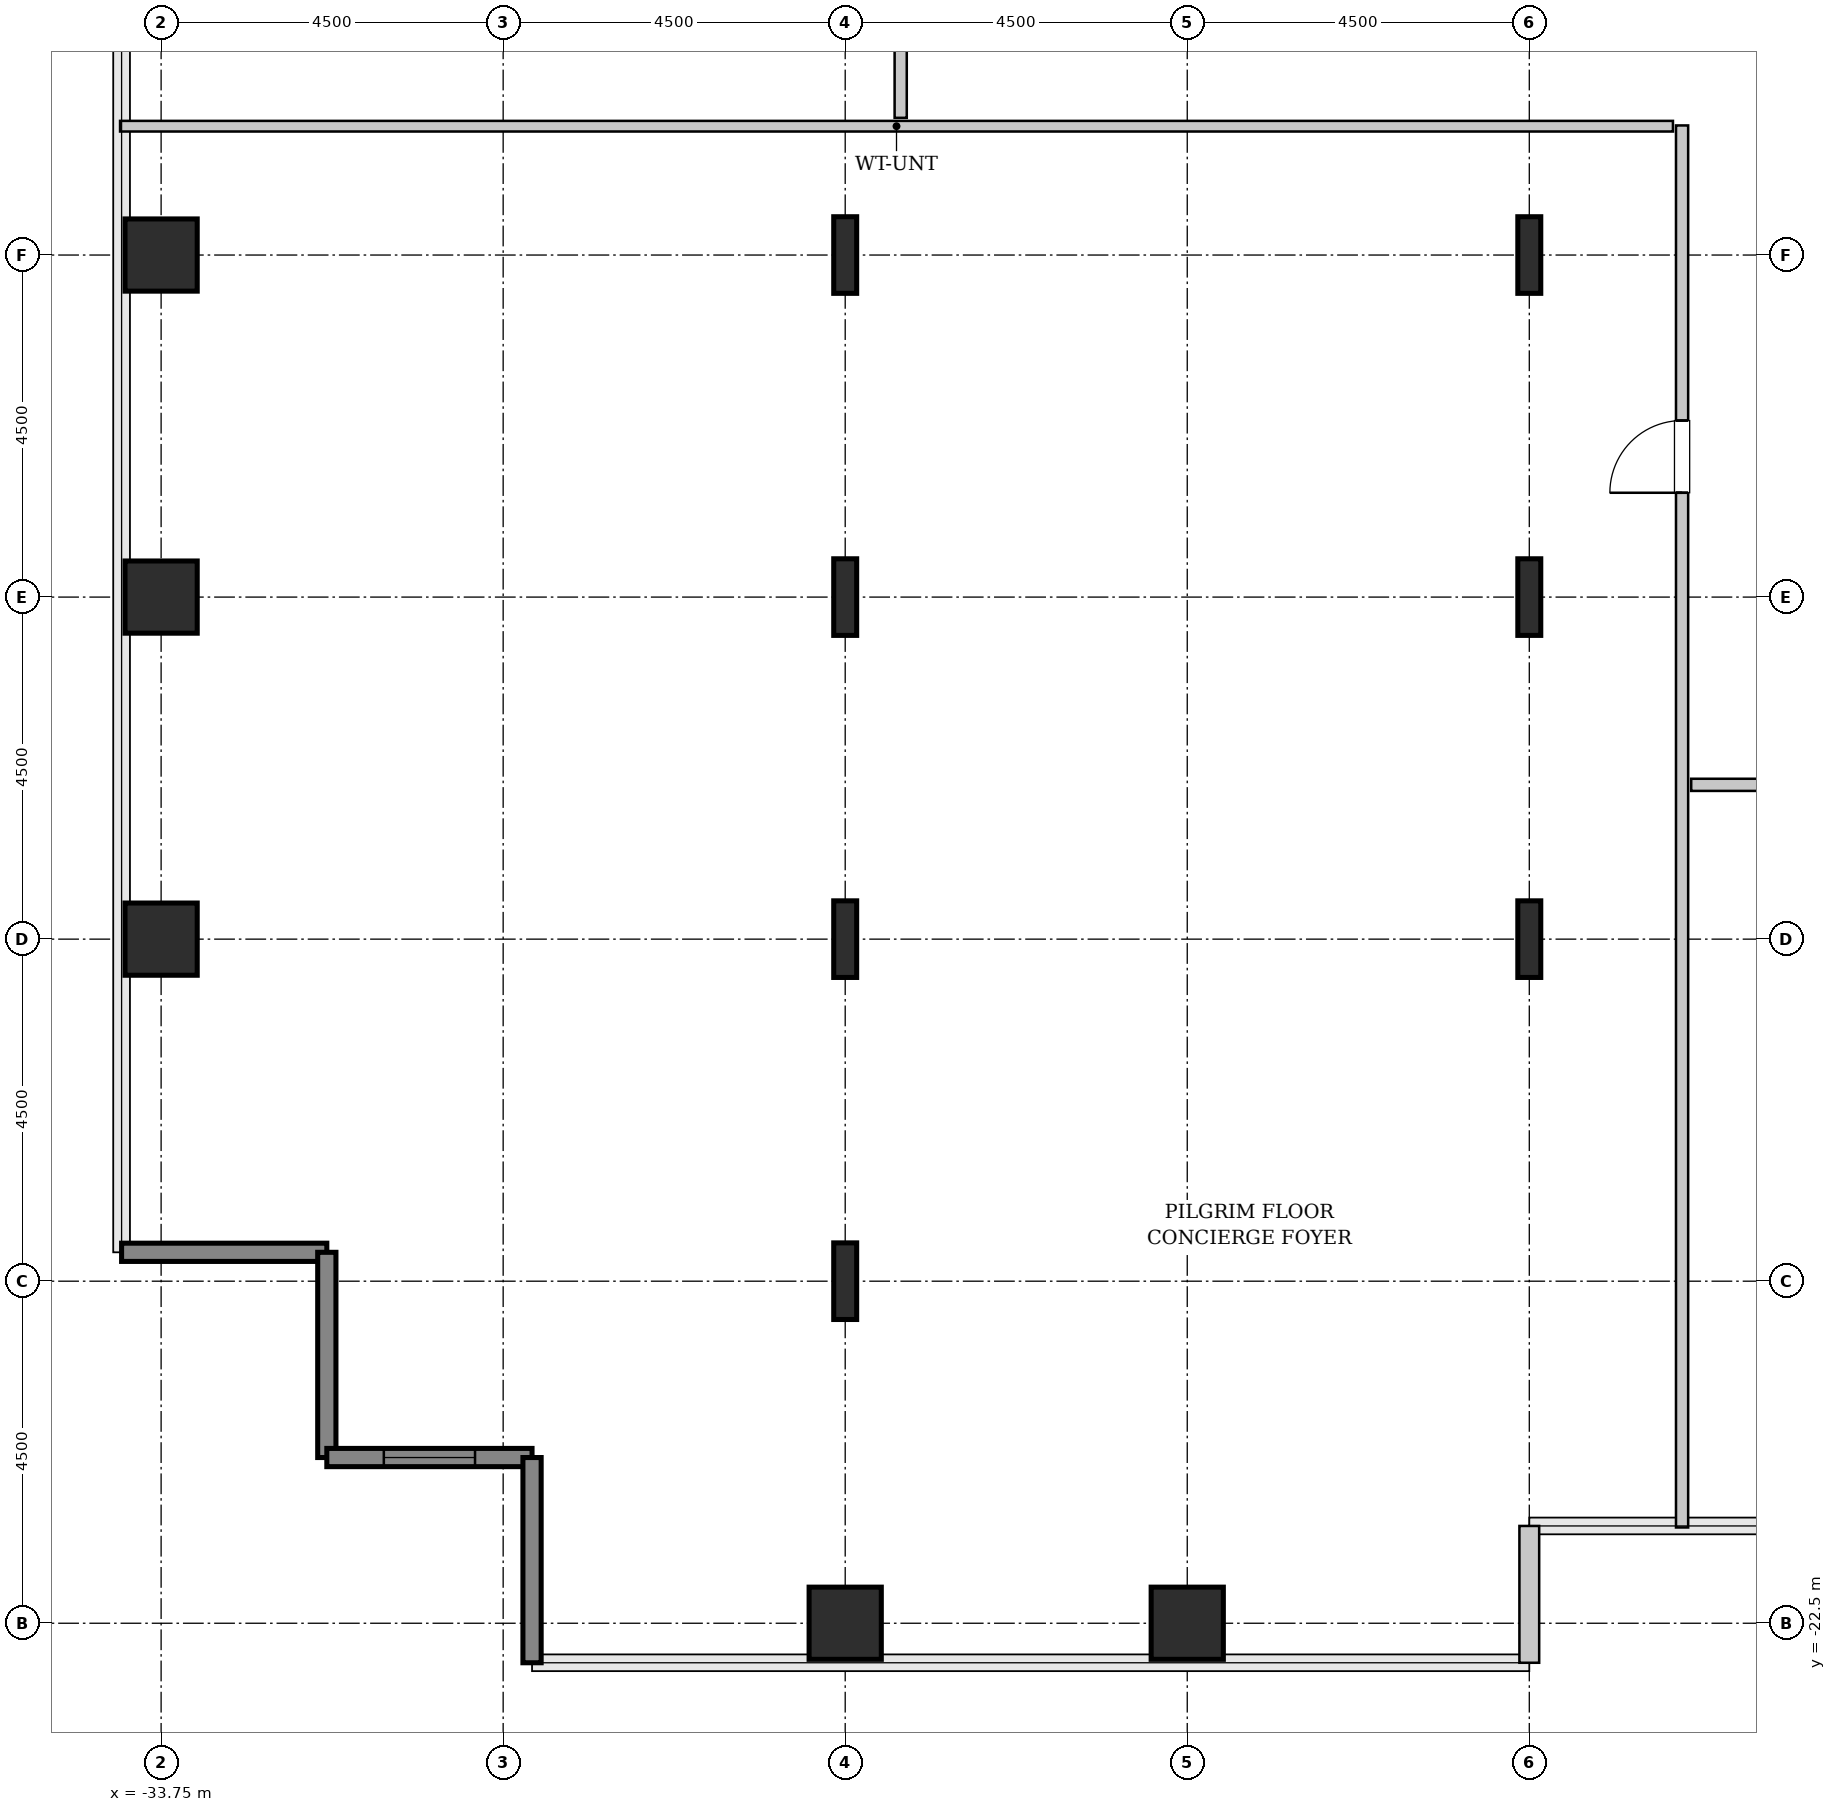
"""IFC4 building model, lengths in metres.
Left out: names, types, materials, properties, quantities, classifications, styles, units other than length and angle.
Written with IfcOpenShell. Run it as: python <this file> out.ifc"""

import sys

from ifc_helpers import new_model, si_unit, direction, frame, frame_2d, origin, origin_2d, place, context, subcontext, project, spatial, rectangle, hollow_rectangle, i_section, extrude, source, transform, mapped, element, fill, save


model = new_model("IFC4")
c1 = context("Model", 3, precision=1e-05, world=origin(), true_north=direction((0.0, 1.0)))
c2 = subcontext(c1, "Body", "Model", "MODEL_VIEW")
j1 = project(units=[si_unit("LENGTHUNIT", "METRE"), si_unit("PLANEANGLEUNIT", "RADIAN")], contexts=[c1])
p1 = place(None, origin())
s1 = spatial("IfcSite", under=j1, at=p1, CompositionType="ELEMENT")
p2 = place(p1, origin())
s2 = spatial("IfcBuilding", under=s1, at=p2, CompositionType="ELEMENT")
p3 = place(p2, frame((0.0, 0.0, 106.0)))
s3 = spatial("IfcBuildingStorey", under=s2, at=p3, CompositionType="ELEMENT", Elevation=106.0)
m1 = source(origin(), c2, "Body", "SweptSolid", [
    extrude(hollow_rectangle(XDim=0.95, YDim=0.95, WallThickness=0.045, InnerFilletRadius=0.045, OuterFilletRadius=0.09, at=origin_2d()), origin(), (0.0, 0.0, 1.0), 3.8),
])
for number, where, z_axis, x_axis in (
    (1, (-33.75, -13.5, 0.0), (0.0, 0.0, 1.0), (1.0, 0.0, 0.0)),
    (2, (-33.75, -9.0, 0.0), (0.0, 0.0, 1.0), (1.0, 0.0, 0.0)),
    (3, (-33.75, -4.5, 0.0), (0.0, 0.0, 1.0), (1.0, 0.0, 0.0)),
    (4, (-24.75, -22.5, 0.0), (0.0, 0.0, 1.0), (1.0, 0.0, 0.0)),
):
    element("IfcColumn", number, at=place(p3, frame(where, z_axis=z_axis, x_axis=x_axis)), inside=s3, PredefinedType="COLUMN", context=c2, shape_type="MappedRepresentation", body=[
        mapped(m1, transform((0.0, 0.0, 0.0), x_axis=(1.0, 0.0, 0.0), y_axis=(0.0, 1.0, 0.0), z_axis=(0.0, 0.0, 1.0), scale=1.0)),
    ])
m2 = source(origin(), c2, "Body", "SweptSolid", [
    extrude(i_section(OverallWidth=0.302, OverallDepth=1.008, WebThickness=0.021, FlangeThickness=0.04, FilletRadius=0.03, at=origin_2d()), origin(), (0.0, 0.0, 1.0), 3.8),
])
for number, where, z_axis, x_axis in (
    (5, (-24.75, -18.0, 0.0), (0.0, 0.0, 1.0), (1.0, 0.0, 0.0)),
    (6, (-24.75, -13.5, 0.0), (0.0, 0.0, 1.0), (1.0, 0.0, 0.0)),
    (7, (-24.75, -9.0, 0.0), (0.0, 0.0, 1.0), (1.0, 0.0, 0.0)),
    (8, (-24.75, -4.5, 0.0), (0.0, 0.0, 1.0), (1.0, 0.0, 0.0)),
):
    element("IfcColumn", number, at=place(p3, frame(where, z_axis=z_axis, x_axis=x_axis)), inside=s3, PredefinedType="COLUMN", context=c2, shape_type="MappedRepresentation", body=[
        mapped(m2, transform((0.0, 0.0, 0.0), x_axis=(1.0, 0.0, 0.0), y_axis=(0.0, 1.0, 0.0), z_axis=(0.0, 0.0, 1.0), scale=1.0)),
    ])
p4 = place(p3, frame((-20.25, -22.5, 0.0), z_axis=(0.0, 0.0, 1.0), x_axis=(1.0, 0.0, 0.0)))
e9 = element("IfcColumn", 9, at=p4, inside=s3, PredefinedType="COLUMN", context=c2, shape_type="MappedRepresentation", body=[
    mapped(m1, transform((0.0, 0.0, 0.0), x_axis=(1.0, 0.0, 0.0), y_axis=(0.0, 1.0, 0.0), z_axis=(0.0, 0.0, 1.0), scale=1.0)),
])
for number, where, z_axis, x_axis in (
    (10, (-15.75, -13.5, 0.0), (0.0, 0.0, 1.0), (1.0, 0.0, 0.0)),
    (11, (-15.75, -9.0, 0.0), (0.0, 0.0, 1.0), (1.0, 0.0, 0.0)),
    (12, (-15.75, -4.5, 0.0), (0.0, 0.0, 1.0), (1.0, 0.0, 0.0)),
):
    element("IfcColumn", number, at=place(p3, frame(where, z_axis=z_axis, x_axis=x_axis)), inside=s3, PredefinedType="COLUMN", context=c2, shape_type="MappedRepresentation", body=[
        mapped(m2, transform((0.0, 0.0, 0.0), x_axis=(1.0, 0.0, 0.0), y_axis=(0.0, 1.0, 0.0), z_axis=(0.0, 0.0, 1.0), scale=1.0)),
    ])
m3 = source(origin(), c2, "Body", "SweptSolid", [
    extrude(rectangle(XDim=2.7, YDim=0.24, at=frame_2d((1.35, 0.0))), origin(), (0.0, 0.0, 1.0), 3.55),
])
for number, where, z_axis, x_axis in (
    (13, (-34.27, -17.62, 0.0), (0.0, 0.0, 1.0), (1.0, 0.0, 0.0)),
    (14, (-31.57, -17.62, 0.0), (0.0, 0.0, 1.0), (0.0, -1.0, 0.0)),
):
    element("IfcWall", number, at=place(p3, frame(where, z_axis=z_axis, x_axis=x_axis)), inside=s3, PredefinedType="SHEAR", context=c2, shape_type="MappedRepresentation", body=[
        mapped(m3, transform((0.0, 0.0, 0.0), x_axis=(1.0, 0.0, 0.0), y_axis=(0.0, 1.0, 0.0), z_axis=(0.0, 0.0, 1.0), scale=1.0)),
    ])
p5 = place(p3, frame((-31.57, -20.32, 0.0), z_axis=(0.0, 0.0, 1.0), x_axis=(1.0, 0.0, 0.0)))
e15 = element("IfcWall", 15, at=p5, inside=s3, PredefinedType="SHEAR", context=c2, shape_type="MappedRepresentation", body=[
    mapped(m3, transform((0.0, 0.0, 0.0), x_axis=(1.0, 0.0, 0.0), y_axis=(0.0, 1.0, 0.0), z_axis=(0.0, 0.0, 1.0), scale=1.0)),
])
p6 = place(p5, frame((0.75, 0.0, 0.85)))
e16 = element("IfcOpeningElement", 16, at=p6, cuts=e15, PredefinedType="OPENING", context=c2, shape_type="SweptSolid", body=[
    extrude(rectangle(XDim=1.2, YDim=1.8, at=frame_2d((0.6, 0.9))), frame((0.0, 0.13, 0.0), z_axis=(0.0, -1.0, 0.0), x_axis=(1.0, 0.0, 0.0)), (0.0, 0.0, 1.0), 0.26),
])
p7 = place(p3, frame((-28.87, -20.32, 0.0), z_axis=(0.0, 0.0, 1.0), x_axis=(0.0, -1.0, 0.0)))
e17 = element("IfcWall", 17, at=p7, inside=s3, PredefinedType="SHEAR", context=c2, shape_type="MappedRepresentation", body=[
    mapped(m3, transform((0.0, 0.0, 0.0), x_axis=(1.0, 0.0, 0.0), y_axis=(0.0, 1.0, 0.0), z_axis=(0.0, 0.0, 1.0), scale=1.0)),
])
m4 = source(origin(), c2, "Body", "SweptSolid", [
    extrude(rectangle(XDim=1.8, YDim=0.26, at=frame_2d((0.9, 0.0))), origin(), (0.0, 0.0, 1.0), 3.55),
])
p8 = place(p3, frame((-15.75, -23.02, 0.0), z_axis=(0.0, 0.0, 1.0), x_axis=(0.0, 1.0, 0.0)))
e18 = element("IfcWall", 18, at=p8, inside=s3, PredefinedType="SOLIDWALL", context=c2, shape_type="MappedRepresentation", body=[
    mapped(m4, transform((0.0, 0.0, 0.0), x_axis=(1.0, 0.0, 0.0), y_axis=(0.0, 1.0, 0.0), z_axis=(0.0, 0.0, 1.0), scale=1.0)),
])
m5 = source(origin(), c2, "Body", "SweptSolid", [
    extrude(rectangle(XDim=18.445, YDim=0.16, at=frame_2d((9.223, 0.0))), origin(), (0.0, 0.0, 1.0), 3.535),
])
p9 = place(p3, frame((-13.74, -21.24, 0.0), z_axis=(0.0, 0.0, 1.0), x_axis=(0.0, 1.0, 0.0)))
e19 = element("IfcWall", 19, at=p9, inside=s3, PredefinedType="PARTITIONING", context=c2, shape_type="MappedRepresentation", body=[
    mapped(m5, transform((0.0, 0.0, 0.0), x_axis=(1.0, 0.0, 0.0), y_axis=(0.0, 1.0, 0.0), z_axis=(0.0, 0.0, 1.0), scale=1.0)),
])
p10 = place(p9, frame((13.613, 0.0, 0.0)))
e20 = element("IfcOpeningElement", 20, at=p10, cuts=e19, PredefinedType="OPENING", context=c2, shape_type="SweptSolid", body=[
    extrude(rectangle(XDim=0.95, YDim=2.1, at=frame_2d((0.475, 1.05))), frame((0.0, 0.09, 0.0), z_axis=(0.0, -1.0, 0.0), x_axis=(1.0, 0.0, 0.0)), (0.0, 0.0, 1.0), 0.18),
])
m6 = source(origin(), c2, "Body", "SweptSolid", [
    extrude(rectangle(XDim=20.43, YDim=0.14, at=frame_2d((10.215, 0.0))), origin(), (0.0, 0.0, 1.0), 3.535),
])
p11 = place(p3, frame((-34.29, -2.805, 0.0), z_axis=(0.0, 0.0, 1.0), x_axis=(1.0, 0.0, 0.0)))
e21 = element("IfcWall", 21, at=p11, inside=s3, PredefinedType="PARTITIONING", context=c2, shape_type="MappedRepresentation", body=[
    mapped(m6, transform((0.0, 0.0, 0.0), x_axis=(1.0, 0.0, 0.0), y_axis=(0.0, 1.0, 0.0), z_axis=(0.0, 0.0, 1.0), scale=1.0)),
])
m7 = source(origin(), c2, "Body", "SweptSolid", [
    extrude(rectangle(XDim=12.683, YDim=0.16, at=frame_2d((6.341, 0.0))), origin(), (0.0, 0.0, 1.0), 3.535),
])
p12 = place(p3, frame((-24.02, -2.695, 0.0), z_axis=(0.0, 0.0, 1.0), x_axis=(0.0, 1.0, 0.0)))
e22 = element("IfcWall", 22, at=p12, inside=s3, PredefinedType="PARTITIONING", context=c2, shape_type="MappedRepresentation", body=[
    mapped(m7, transform((0.0, 0.0, 0.0), x_axis=(1.0, 0.0, 0.0), y_axis=(0.0, 1.0, 0.0), z_axis=(0.0, 0.0, 1.0), scale=1.0)),
])
p13 = place(p12, frame((4.47, 0.0, 0.0)))
e23 = element("IfcOpeningElement", 23, at=p13, cuts=e22, PredefinedType="OPENING", context=c2, shape_type="SweptSolid", body=[
    extrude(rectangle(XDim=0.95, YDim=2.1, at=frame_2d((0.475, 1.05))), frame((0.0, 0.09, 0.0), z_axis=(0.0, -1.0, 0.0), x_axis=(1.0, 0.0, 0.0)), (0.0, 0.0, 1.0), 0.18),
])
m8 = source(origin(), c2, "Body", "SweptSolid", [
    extrude(rectangle(XDim=5.46, YDim=0.16, at=frame_2d((2.73, 0.0))), origin(), (0.0, 0.0, 1.0), 3.535),
])
p14 = place(p3, frame((-13.62, -11.47, 0.0), z_axis=(0.0, 0.0, 1.0), x_axis=(1.0, 0.0, 0.0)))
e24 = element("IfcWall", 24, at=p14, inside=s3, PredefinedType="PARTITIONING", context=c2, shape_type="MappedRepresentation", body=[
    mapped(m8, transform((0.0, 0.0, 0.0), x_axis=(1.0, 0.0, 0.0), y_axis=(0.0, 1.0, 0.0), z_axis=(0.0, 0.0, 1.0), scale=1.0)),
])
p15 = place(p14, frame((2.255, 0.0, 0.0)))
e25 = element("IfcOpeningElement", 25, at=p15, cuts=e24, PredefinedType="OPENING", context=c2, shape_type="SweptSolid", body=[
    extrude(rectangle(XDim=0.95, YDim=2.1, at=frame_2d((0.475, 1.05))), frame((0.0, 0.09, 0.0), z_axis=(0.0, -1.0, 0.0), x_axis=(1.0, 0.0, 0.0)), (0.0, 0.0, 1.0), 0.18),
])
m9 = source(origin(), c2, "Body", "SweptSolid", [
    extrude(rectangle(XDim=1.2, YDim=1.8, at=frame_2d((0.6, 0.9))), frame((0.0, 0.03, 0.0), z_axis=(0.0, -1.0, 0.0), x_axis=(1.0, 0.0, 0.0)), (0.0, 0.0, 1.0), 0.06),
])
p16 = place(p6, origin())
e26 = element("IfcWindow", 26, at=p16, inside=s3, PartitioningType="SINGLE_PANEL", PredefinedType="WINDOW", context=c2, shape_type="MappedRepresentation", body=[
    mapped(m9, transform((0.0, 0.0, 0.0), x_axis=(1.0, 0.0, 0.0), y_axis=(0.0, 1.0, 0.0), z_axis=(0.0, 0.0, 1.0), scale=1.0)),
])
fill(e16, e26)
m10 = source(origin(), c2, "Body", "SweptSolid", [
    extrude(rectangle(XDim=0.95, YDim=2.1, at=frame_2d((0.475, 1.05))), frame((0.0, 0.025, 0.0), z_axis=(0.0, -1.0, 0.0), x_axis=(1.0, 0.0, 0.0)), (0.0, 0.0, 1.0), 0.05),
])
p17 = place(p10, origin())
e27 = element("IfcDoor", 27, at=p17, inside=s3, OperationType="SINGLE_SWING_LEFT", PredefinedType="DOOR", context=c2, shape_type="MappedRepresentation", body=[
    mapped(m10, transform((0.0, 0.0, 0.0), x_axis=(1.0, 0.0, 0.0), y_axis=(0.0, 1.0, 0.0), z_axis=(0.0, 0.0, 1.0), scale=1.0)),
])
fill(e20, e27)
save(model, sys.argv[1])
